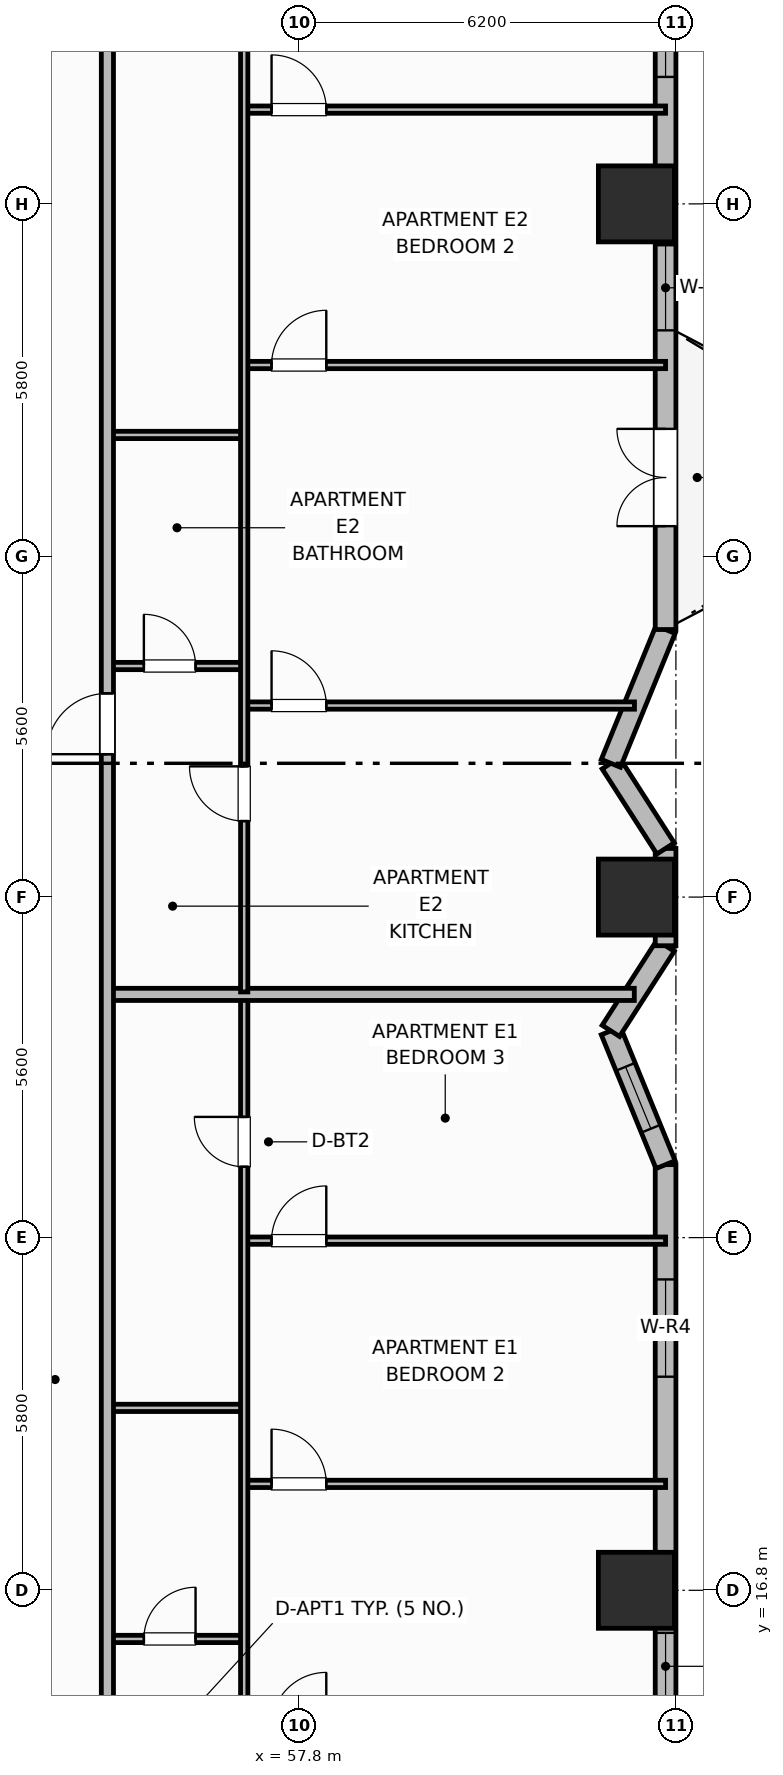
"""IFC4 building model, lengths in metres.
Left out: names, types, materials, properties, quantities, classifications, styles, units other than length and angle.
Written with IfcOpenShell. Run it as: python <this file> out.ifc"""

import sys

from ifc_helpers import new_model, si_unit, direction, frame, frame_2d, origin, origin_2d, place, context, subcontext, project, spatial, rectangle, extrude, element, fill, save


model = new_model("IFC4")
c1 = context("Model", 3, precision=1e-05, world=origin(), true_north=direction((0.0, 1.0)))
c2 = subcontext(c1, "Body", "Model", "MODEL_VIEW")
j1 = project(units=[si_unit("LENGTHUNIT", "METRE"), si_unit("PLANEANGLEUNIT", "RADIAN")], contexts=[c1])
p1 = place(None, origin())
s1 = spatial("IfcSite", under=j1, at=p1, CompositionType="ELEMENT")
p2 = place(p1, origin())
s2 = spatial("IfcBuilding", under=s1, at=p2, CompositionType="ELEMENT")
p3 = place(p2, frame((0.0, 0.0, 43.6)))
s3 = spatial("IfcBuildingStorey", under=s2, at=p3, CompositionType="ELEMENT", Elevation=43.6)
for number, where, z_axis, x_axis in (
    (1, (63.35, 16.8, 0.0), (0.0, 0.0, 1.0), (1.0, 0.0, 0.0)),
    (2, (63.35, 28.2, 0.0), (0.0, 0.0, 1.0), (1.0, 0.0, 0.0)),
    (3, (63.35, 39.6, 0.0), (0.0, 0.0, 1.0), (1.0, 0.0, 0.0)),
):
    element("IfcColumn", number, at=place(p3, frame(where, z_axis=z_axis, x_axis=x_axis)), inside=s3, PredefinedType="COLUMN", context=c2, shape_type="SweptSolid", body=[
        extrude(rectangle(XDim=1.25, YDim=1.25, at=origin_2d()), origin(), (0.0, 0.0, 1.0), 3.7),
    ])
p4 = place(p3, frame((63.83, 9.0, 0.0), z_axis=(0.0, 0.0, 1.0), x_axis=(0.0, 1.0, 0.0)))
e4 = element("IfcWall", 4, at=p4, inside=s3, PredefinedType="SOLIDWALL", context=c2, shape_type="SweptSolid", body=[
    extrude(rectangle(XDim=14.8, YDim=0.34, at=frame_2d((7.4, 0.0))), origin(), (0.0, 0.0, 1.0), 2.7),
])
p5 = place(p4, frame((6.0, 0.0, 0.89)))
e5 = element("IfcOpeningElement", 5, at=p5, cuts=e4, PredefinedType="OPENING", context=c2, shape_type="SweptSolid", body=[
    extrude(rectangle(XDim=1.1, YDim=1.65, at=frame_2d((0.55, 0.825))), frame((0.0, 0.18, 0.0), z_axis=(0.0, -1.0, 0.0), x_axis=(1.0, 0.0, 0.0)), (0.0, 0.0, 1.0), 0.36),
])
p6 = place(p4, frame((11.312, 0.0, 0.68)))
e6 = element("IfcOpeningElement", 6, at=p6, cuts=e4, PredefinedType="OPENING", context=c2, shape_type="SweptSolid", body=[
    extrude(rectangle(XDim=1.6, YDim=1.9, at=frame_2d((0.8, 0.95))), frame((0.0, 0.18, 0.0), z_axis=(0.0, -1.0, 0.0), x_axis=(1.0, 0.0, 0.0)), (0.0, 0.0, 1.0), 0.36),
])
p7 = place(p3, frame((63.83, 23.8, 0.0), z_axis=(0.0, 0.0, 1.0), x_axis=(-0.378692835005, 0.925522412865, 0.0)))
e7 = element("IfcWall", 7, at=p7, inside=s3, PredefinedType="SOLIDWALL", context=c2, shape_type="SweptSolid", body=[
    extrude(rectangle(XDim=2.377, YDim=0.34, at=frame_2d((1.188, 0.0))), origin(), (0.0, 0.0, 1.0), 2.7),
])
p8 = place(p7, frame((0.638, 0.0, 0.89)))
e8 = element("IfcOpeningElement", 8, at=p8, cuts=e7, PredefinedType="OPENING", context=c2, shape_type="SweptSolid", body=[
    extrude(rectangle(XDim=1.1, YDim=1.65, at=frame_2d((0.55, 0.825))), frame((0.0, 0.18, 0.0), z_axis=(0.0, -1.0, 0.0), x_axis=(1.0, 0.0, 0.0)), (0.0, 0.0, 1.0), 0.36),
])
p9 = place(p3, frame((62.93, 26.0, 0.0), z_axis=(0.0, 0.0, 1.0), x_axis=(0.540846555596, 0.841121277403, 0.0)))
e9 = element("IfcWall", 9, at=p9, inside=s3, PredefinedType="SOLIDWALL", context=c2, shape_type="SweptSolid", body=[
    extrude(rectangle(XDim=1.664, YDim=0.34, at=frame_2d((0.832, 0.0))), origin(), (0.0, 0.0, 1.0), 2.7),
])
p10 = place(p3, frame((63.83, 27.4, 0.0), z_axis=(0.0, 0.0, 1.0), x_axis=(0.0, 1.0, 0.0)))
e10 = element("IfcWall", 10, at=p10, inside=s3, PredefinedType="SOLIDWALL", context=c2, shape_type="SweptSolid", body=[
    extrude(rectangle(XDim=1.6, YDim=0.34, at=frame_2d((0.8, 0.0))), origin(), (0.0, 0.0, 1.0), 2.7),
])
p11 = place(p3, frame((63.83, 29.0, 0.0), z_axis=(0.0, 0.0, 1.0), x_axis=(-0.540846555596, 0.841121277403, 0.0)))
e11 = element("IfcWall", 11, at=p11, inside=s3, PredefinedType="SOLIDWALL", context=c2, shape_type="SweptSolid", body=[
    extrude(rectangle(XDim=1.664, YDim=0.34, at=frame_2d((0.832, 0.0))), origin(), (0.0, 0.0, 1.0), 2.7),
])
p12 = place(p3, frame((62.93, 30.4, 0.0), z_axis=(0.0, 0.0, 1.0), x_axis=(0.378656839344, 0.925537140269, 0.0)))
e12 = element("IfcWall", 12, at=p12, inside=s3, PredefinedType="SOLIDWALL", context=c2, shape_type="SweptSolid", body=[
    extrude(rectangle(XDim=2.377, YDim=0.34, at=frame_2d((1.188, 0.0))), origin(), (0.0, 0.0, 1.0), 2.7),
])
p13 = place(p3, frame((63.83, 32.6, 0.0), z_axis=(0.0, 0.0, 1.0), x_axis=(0.0, 1.0, 0.0)))
e13 = element("IfcWall", 13, at=p13, inside=s3, PredefinedType="SOLIDWALL", context=c2, shape_type="SweptSolid", body=[
    extrude(rectangle(XDim=14.8, YDim=0.34, at=frame_2d((7.4, 0.0))), origin(), (0.0, 0.0, 1.0), 2.7),
])
p14 = place(p13, frame((1.7, 0.0, 0.0)))
e14 = element("IfcOpeningElement", 14, at=p14, cuts=e13, PredefinedType="OPENING", context=c2, shape_type="SweptSolid", body=[
    extrude(rectangle(XDim=1.6, YDim=2.1, at=frame_2d((0.8, 1.05))), frame((0.0, 0.18, 0.0), z_axis=(0.0, -1.0, 0.0), x_axis=(1.0, 0.0, 0.0)), (0.0, 0.0, 1.0), 0.36),
])
p15 = place(p13, frame((4.92, 0.0, 0.69)))
e15 = element("IfcOpeningElement", 15, at=p15, cuts=e13, PredefinedType="OPENING", context=c2, shape_type="SweptSolid", body=[
    extrude(rectangle(XDim=1.4, YDim=1.85, at=frame_2d((0.7, 0.925))), frame((0.0, 0.18, 0.0), z_axis=(0.0, -1.0, 0.0), x_axis=(1.0, 0.0, 0.0)), (0.0, 0.0, 1.0), 0.36),
])
p16 = place(p13, frame((9.087, 0.0, 0.73)))
e16 = element("IfcOpeningElement", 16, at=p16, cuts=e13, PredefinedType="OPENING", context=c2, shape_type="SweptSolid", body=[
    extrude(rectangle(XDim=1.4, YDim=1.85, at=frame_2d((0.7, 0.925))), frame((0.0, 0.18, 0.0), z_axis=(0.0, -1.0, 0.0), x_axis=(1.0, 0.0, 0.0)), (0.0, 0.0, 1.0), 0.36),
])
p17 = place(p3, frame((54.65, 16.0, 0.0), z_axis=(0.0, 0.0, 1.0), x_axis=(1.0, 0.0, 0.0)))
e17 = element("IfcWall", 17, at=p17, inside=s3, PredefinedType="PARTITIONING", context=c2, shape_type="SweptSolid", body=[
    extrude(rectangle(XDim=2.25, YDim=0.12, at=frame_2d((1.125, 0.0))), origin(), (0.0, 0.0, 1.0), 2.53),
])
p18 = place(p17, frame((0.6, 0.0, 0.0)))
e18 = element("IfcOpeningElement", 18, at=p18, cuts=e17, PredefinedType="OPENING", context=c2, shape_type="SweptSolid", body=[
    extrude(rectangle(XDim=0.85, YDim=2.1, at=frame_2d((0.425, 1.05))), frame((0.0, 0.07, 0.0), z_axis=(0.0, -1.0, 0.0), x_axis=(1.0, 0.0, 0.0)), (0.0, 0.0, 1.0), 0.14),
])
p19 = place(p3, frame((54.65, 19.8, 0.0), z_axis=(0.0, 0.0, 1.0), x_axis=(1.0, 0.0, 0.0)))
e19 = element("IfcWall", 19, at=p19, inside=s3, PredefinedType="PARTITIONING", context=c2, shape_type="SweptSolid", body=[
    extrude(rectangle(XDim=2.25, YDim=0.12, at=frame_2d((1.125, 0.0))), origin(), (0.0, 0.0, 1.0), 2.53),
])
p20 = place(p3, frame((56.9, 18.55, 0.0), z_axis=(0.0, 0.0, 1.0), x_axis=(1.0, 0.0, 0.0)))
e20 = element("IfcWall", 20, at=p20, inside=s3, PredefinedType="PARTITIONING", context=c2, shape_type="SweptSolid", body=[
    extrude(rectangle(XDim=6.93, YDim=0.12, at=frame_2d((3.465, 0.0))), origin(), (0.0, 0.0, 1.0), 2.53),
])
p21 = place(p20, frame((0.45, 0.0, 0.0)))
e21 = element("IfcOpeningElement", 21, at=p21, cuts=e20, PredefinedType="OPENING", context=c2, shape_type="SweptSolid", body=[
    extrude(rectangle(XDim=0.9, YDim=2.1, at=frame_2d((0.45, 1.05))), frame((0.0, 0.07, 0.0), z_axis=(0.0, -1.0, 0.0), x_axis=(1.0, 0.0, 0.0)), (0.0, 0.0, 1.0), 0.14),
])
p22 = place(p3, frame((56.9, 22.55, 0.0), z_axis=(0.0, 0.0, 1.0), x_axis=(1.0, 0.0, 0.0)))
e22 = element("IfcWall", 22, at=p22, inside=s3, PredefinedType="PARTITIONING", context=c2, shape_type="SweptSolid", body=[
    extrude(rectangle(XDim=6.93, YDim=0.12, at=frame_2d((3.465, 0.0))), origin(), (0.0, 0.0, 1.0), 2.53),
])
p23 = place(p22, frame((0.45, 0.0, 0.0)))
e23 = element("IfcOpeningElement", 23, at=p23, cuts=e22, PredefinedType="OPENING", context=c2, shape_type="SweptSolid", body=[
    extrude(rectangle(XDim=0.9, YDim=2.1, at=frame_2d((0.45, 1.05))), frame((0.0, 0.07, 0.0), z_axis=(0.0, -1.0, 0.0), x_axis=(1.0, 0.0, 0.0)), (0.0, 0.0, 1.0), 0.14),
])
p24 = place(p3, frame((56.9, 10.64, 0.0), z_axis=(0.0, 0.0, 1.0), x_axis=(0.0, 1.0, 0.0)))
e24 = element("IfcWall", 24, at=p24, inside=s3, PredefinedType="PARTITIONING", context=c2, shape_type="SweptSolid", body=[
    extrude(rectangle(XDim=15.92, YDim=0.12, at=frame_2d((7.96, 0.0))), origin(), (0.0, 0.0, 1.0), 2.53),
])
p25 = place(p24, frame((0.41, 0.0, 0.0)))
e25 = element("IfcOpeningElement", 25, at=p25, cuts=e24, PredefinedType="OPENING", context=c2, shape_type="SweptSolid", body=[
    extrude(rectangle(XDim=0.9, YDim=2.1, at=frame_2d((0.45, 1.05))), frame((0.0, 0.07, 0.0), z_axis=(0.0, -1.0, 0.0), x_axis=(1.0, 0.0, 0.0)), (0.0, 0.0, 1.0), 0.14),
])
p26 = place(p24, frame((13.125, 0.0, 0.0)))
e26 = element("IfcOpeningElement", 26, at=p26, cuts=e24, PredefinedType="OPENING", context=c2, shape_type="SweptSolid", body=[
    extrude(rectangle(XDim=0.82, YDim=2.08, at=frame_2d((0.41, 1.04))), frame((0.0, 0.07, 0.0), z_axis=(0.0, -1.0, 0.0), x_axis=(1.0, 0.0, 0.0)), (0.0, 0.0, 1.0), 0.14),
])
p27 = place(p3, frame((54.65, 26.6, 0.0), z_axis=(0.0, 0.0, 1.0), x_axis=(1.0, 0.0, 0.0)))
e27 = element("IfcWall", 27, at=p27, inside=s3, PredefinedType="PARTITIONING", context=c2, shape_type="SweptSolid", body=[
    extrude(rectangle(XDim=8.666, YDim=0.2, at=frame_2d((4.333, 0.0))), origin(), (0.0, 0.0, 1.0), 2.53),
])
p28 = place(p3, frame((54.65, 32.0, 0.0), z_axis=(0.0, 0.0, 1.0), x_axis=(1.0, 0.0, 0.0)))
e28 = element("IfcWall", 28, at=p28, inside=s3, PredefinedType="PARTITIONING", context=c2, shape_type="SweptSolid", body=[
    extrude(rectangle(XDim=2.25, YDim=0.12, at=frame_2d((1.125, 0.0))), origin(), (0.0, 0.0, 1.0), 2.53),
])
p29 = place(p28, frame((0.6, 0.0, 0.0)))
e29 = element("IfcOpeningElement", 29, at=p29, cuts=e28, PredefinedType="OPENING", context=c2, shape_type="SweptSolid", body=[
    extrude(rectangle(XDim=0.85, YDim=2.1, at=frame_2d((0.425, 1.05))), frame((0.0, 0.07, 0.0), z_axis=(0.0, -1.0, 0.0), x_axis=(1.0, 0.0, 0.0)), (0.0, 0.0, 1.0), 0.14),
])
p30 = place(p3, frame((54.65, 35.8, 0.0), z_axis=(0.0, 0.0, 1.0), x_axis=(1.0, 0.0, 0.0)))
e30 = element("IfcWall", 30, at=p30, inside=s3, PredefinedType="PARTITIONING", context=c2, shape_type="SweptSolid", body=[
    extrude(rectangle(XDim=2.25, YDim=0.12, at=frame_2d((1.125, 0.0))), origin(), (0.0, 0.0, 1.0), 2.53),
])
p31 = place(p3, frame((56.9, 31.35, 0.0), z_axis=(0.0, 0.0, 1.0), x_axis=(1.0, 0.0, 0.0)))
e31 = element("IfcWall", 31, at=p31, inside=s3, PredefinedType="PARTITIONING", context=c2, shape_type="SweptSolid", body=[
    extrude(rectangle(XDim=6.419, YDim=0.12, at=frame_2d((3.209, 0.0))), origin(), (0.0, 0.0, 1.0), 2.53),
])
p32 = place(p31, frame((0.45, 0.0, 0.0)))
e32 = element("IfcOpeningElement", 32, at=p32, cuts=e31, PredefinedType="OPENING", context=c2, shape_type="SweptSolid", body=[
    extrude(rectangle(XDim=0.9, YDim=2.1, at=frame_2d((0.45, 1.05))), frame((0.0, 0.07, 0.0), z_axis=(0.0, -1.0, 0.0), x_axis=(1.0, 0.0, 0.0)), (0.0, 0.0, 1.0), 0.14),
])
p33 = place(p3, frame((56.9, 36.95, 0.0), z_axis=(0.0, 0.0, 1.0), x_axis=(1.0, 0.0, 0.0)))
e33 = element("IfcWall", 33, at=p33, inside=s3, PredefinedType="PARTITIONING", context=c2, shape_type="SweptSolid", body=[
    extrude(rectangle(XDim=6.93, YDim=0.12, at=frame_2d((3.465, 0.0))), origin(), (0.0, 0.0, 1.0), 2.53),
])
p34 = place(p33, frame((0.45, 0.0, 0.0)))
e34 = element("IfcOpeningElement", 34, at=p34, cuts=e33, PredefinedType="OPENING", context=c2, shape_type="SweptSolid", body=[
    extrude(rectangle(XDim=0.9, YDim=2.1, at=frame_2d((0.45, 1.05))), frame((0.0, 0.07, 0.0), z_axis=(0.0, -1.0, 0.0), x_axis=(1.0, 0.0, 0.0)), (0.0, 0.0, 1.0), 0.14),
])
p35 = place(p3, frame((56.9, 41.15, 0.0), z_axis=(0.0, 0.0, 1.0), x_axis=(1.0, 0.0, 0.0)))
e35 = element("IfcWall", 35, at=p35, inside=s3, PredefinedType="PARTITIONING", context=c2, shape_type="SweptSolid", body=[
    extrude(rectangle(XDim=6.93, YDim=0.12, at=frame_2d((3.465, 0.0))), origin(), (0.0, 0.0, 1.0), 2.53),
])
p36 = place(p35, frame((0.45, 0.0, 0.0)))
e36 = element("IfcOpeningElement", 36, at=p36, cuts=e35, PredefinedType="OPENING", context=c2, shape_type="SweptSolid", body=[
    extrude(rectangle(XDim=0.9, YDim=2.1, at=frame_2d((0.45, 1.05))), frame((0.0, 0.07, 0.0), z_axis=(0.0, -1.0, 0.0), x_axis=(1.0, 0.0, 0.0)), (0.0, 0.0, 1.0), 0.14),
])
p37 = place(p3, frame((56.9, 26.64, 0.0), z_axis=(0.0, 0.0, 1.0), x_axis=(0.0, 1.0, 0.0)))
e37 = element("IfcWall", 37, at=p37, inside=s3, PredefinedType="PARTITIONING", context=c2, shape_type="SweptSolid", body=[
    extrude(rectangle(XDim=19.12, YDim=0.12, at=frame_2d((9.56, 0.0))), origin(), (0.0, 0.0, 1.0), 2.53),
])
p38 = place(p37, frame((2.81, 0.0, 0.0)))
e38 = element("IfcOpeningElement", 38, at=p38, cuts=e37, PredefinedType="OPENING", context=c2, shape_type="SweptSolid", body=[
    extrude(rectangle(XDim=0.9, YDim=2.1, at=frame_2d((0.45, 1.05))), frame((0.0, 0.07, 0.0), z_axis=(0.0, -1.0, 0.0), x_axis=(1.0, 0.0, 0.0)), (0.0, 0.0, 1.0), 0.14),
])
p39 = place(p37, frame((16.18, 0.0, 0.0)))
e39 = element("IfcOpeningElement", 39, at=p39, cuts=e37, PredefinedType="OPENING", context=c2, shape_type="SweptSolid", body=[
    extrude(rectangle(XDim=0.82, YDim=2.08, at=frame_2d((0.41, 1.04))), frame((0.0, 0.07, 0.0), z_axis=(0.0, -1.0, 0.0), x_axis=(1.0, 0.0, 0.0)), (0.0, 0.0, 1.0), 0.14),
])
p40 = place(p3, frame((54.65, 10.6, 0.0), z_axis=(0.0, 0.0, 1.0), x_axis=(0.0, 1.0, 0.0)))
e40 = element("IfcWall", 40, at=p40, inside=s3, PredefinedType="PARTITIONING", context=c2, shape_type="SweptSolid", body=[
    extrude(rectangle(XDim=35.2, YDim=0.2, at=frame_2d((17.6, 0.0))), origin(), (0.0, 0.0, 1.0), 2.53),
])
p41 = place(p40, frame((2.65, 0.0, 0.0)))
e41 = element("IfcOpeningElement", 41, at=p41, cuts=e40, PredefinedType="OPENING", context=c2, shape_type="SweptSolid", body=[
    extrude(rectangle(XDim=1.0, YDim=2.15, at=frame_2d((0.5, 1.075))), frame((0.0, 0.11, 0.0), z_axis=(0.0, -1.0, 0.0), x_axis=(1.0, 0.0, 0.0)), (0.0, 0.0, 1.0), 0.22),
])
p42 = place(p40, frame((19.95, 0.0, 0.0)))
e42 = element("IfcOpeningElement", 42, at=p42, cuts=e40, PredefinedType="OPENING", context=c2, shape_type="SweptSolid", body=[
    extrude(rectangle(XDim=1.0, YDim=2.15, at=frame_2d((0.5, 1.075))), frame((0.0, 0.11, 0.0), z_axis=(0.0, -1.0, 0.0), x_axis=(1.0, 0.0, 0.0)), (0.0, 0.0, 1.0), 0.22),
])
p43 = place(p5, origin())
e43 = element("IfcWindow", 43, at=p43, inside=s3, PartitioningType="SINGLE_PANEL", PredefinedType="WINDOW", context=c2, shape_type="SweptSolid", body=[
    extrude(rectangle(XDim=1.1, YDim=1.65, at=frame_2d((0.55, 0.825))), frame((0.0, 0.03, 0.0), z_axis=(0.0, -1.0, 0.0), x_axis=(1.0, 0.0, 0.0)), (0.0, 0.0, 1.0), 0.06),
])
fill(e5, e43)
p44 = place(p6, origin())
e44 = element("IfcWindow", 44, at=p44, inside=s3, PartitioningType="SINGLE_PANEL", PredefinedType="WINDOW", context=c2, shape_type="SweptSolid", body=[
    extrude(rectangle(XDim=1.6, YDim=1.9, at=frame_2d((0.8, 0.95))), frame((0.0, 0.03, 0.0), z_axis=(0.0, -1.0, 0.0), x_axis=(1.0, 0.0, 0.0)), (0.0, 0.0, 1.0), 0.06),
])
fill(e6, e44)
p45 = place(p8, origin())
e45 = element("IfcWindow", 45, at=p45, inside=s3, PartitioningType="SINGLE_PANEL", PredefinedType="WINDOW", context=c2, shape_type="SweptSolid", body=[
    extrude(rectangle(XDim=1.1, YDim=1.65, at=frame_2d((0.55, 0.825))), frame((0.0, 0.03, 0.0), z_axis=(0.0, -1.0, 0.0), x_axis=(1.0, 0.0, 0.0)), (0.0, 0.0, 1.0), 0.06),
])
fill(e8, e45)
p46 = place(p14, origin())
e46 = element("IfcDoor", 46, at=p46, inside=s3, OperationType="DOUBLE_DOOR_SINGLE_SWING", PredefinedType="DOOR", context=c2, shape_type="SweptSolid", body=[
    extrude(rectangle(XDim=1.6, YDim=2.1, at=frame_2d((0.8, 1.05))), frame((0.0, 0.025, 0.0), z_axis=(0.0, -1.0, 0.0), x_axis=(1.0, 0.0, 0.0)), (0.0, 0.0, 1.0), 0.05),
])
fill(e14, e46)
p47 = place(p15, origin())
e47 = element("IfcWindow", 47, at=p47, inside=s3, PartitioningType="SINGLE_PANEL", PredefinedType="WINDOW", context=c2, shape_type="SweptSolid", body=[
    extrude(rectangle(XDim=1.4, YDim=1.85, at=frame_2d((0.7, 0.925))), frame((0.0, 0.03, 0.0), z_axis=(0.0, -1.0, 0.0), x_axis=(1.0, 0.0, 0.0)), (0.0, 0.0, 1.0), 0.06),
])
fill(e15, e47)
p48 = place(p16, origin())
e48 = element("IfcWindow", 48, at=p48, inside=s3, PartitioningType="SINGLE_PANEL", PredefinedType="WINDOW", context=c2, shape_type="SweptSolid", body=[
    extrude(rectangle(XDim=1.4, YDim=1.85, at=frame_2d((0.7, 0.925))), frame((0.0, 0.03, 0.0), z_axis=(0.0, -1.0, 0.0), x_axis=(1.0, 0.0, 0.0)), (0.0, 0.0, 1.0), 0.06),
])
fill(e16, e48)
p49 = place(p18, origin())
e49 = element("IfcDoor", 49, at=p49, inside=s3, OperationType="SINGLE_SWING_RIGHT", PredefinedType="DOOR", context=c2, shape_type="SweptSolid", body=[
    extrude(rectangle(XDim=0.85, YDim=2.1, at=frame_2d((0.425, 1.05))), frame((0.0, 0.025, 0.0), z_axis=(0.0, -1.0, 0.0), x_axis=(1.0, 0.0, 0.0)), (0.0, 0.0, 1.0), 0.05),
])
fill(e18, e49)
p50 = place(p21, origin())
e50 = element("IfcDoor", 50, at=p50, inside=s3, OperationType="SINGLE_SWING_LEFT", PredefinedType="DOOR", context=c2, shape_type="SweptSolid", body=[
    extrude(rectangle(XDim=0.9, YDim=2.1, at=frame_2d((0.45, 1.05))), frame((0.0, 0.025, 0.0), z_axis=(0.0, -1.0, 0.0), x_axis=(1.0, 0.0, 0.0)), (0.0, 0.0, 1.0), 0.05),
])
fill(e21, e50)
p51 = place(p23, origin())
e51 = element("IfcDoor", 51, at=p51, inside=s3, OperationType="SINGLE_SWING_RIGHT", PredefinedType="DOOR", context=c2, shape_type="SweptSolid", body=[
    extrude(rectangle(XDim=0.9, YDim=2.1, at=frame_2d((0.45, 1.05))), frame((0.0, 0.025, 0.0), z_axis=(0.0, -1.0, 0.0), x_axis=(1.0, 0.0, 0.0)), (0.0, 0.0, 1.0), 0.05),
])
fill(e23, e51)
p52 = place(p26, origin())
e52 = element("IfcDoor", 52, at=p52, inside=s3, OperationType="SINGLE_SWING_RIGHT", PredefinedType="DOOR", context=c2, shape_type="SweptSolid", body=[
    extrude(rectangle(XDim=0.82, YDim=2.08, at=frame_2d((0.41, 1.04))), frame((0.0, 0.025, 0.0), z_axis=(0.0, -1.0, 0.0), x_axis=(1.0, 0.0, 0.0)), (0.0, 0.0, 1.0), 0.05),
])
fill(e26, e52)
p53 = place(p29, origin())
e53 = element("IfcDoor", 53, at=p53, inside=s3, OperationType="SINGLE_SWING_LEFT", PredefinedType="DOOR", context=c2, shape_type="SweptSolid", body=[
    extrude(rectangle(XDim=0.85, YDim=2.1, at=frame_2d((0.425, 1.05))), frame((0.0, 0.025, 0.0), z_axis=(0.0, -1.0, 0.0), x_axis=(1.0, 0.0, 0.0)), (0.0, 0.0, 1.0), 0.05),
])
fill(e29, e53)
p54 = place(p32, origin())
e54 = element("IfcDoor", 54, at=p54, inside=s3, OperationType="SINGLE_SWING_LEFT", PredefinedType="DOOR", context=c2, shape_type="SweptSolid", body=[
    extrude(rectangle(XDim=0.9, YDim=2.1, at=frame_2d((0.45, 1.05))), frame((0.0, 0.025, 0.0), z_axis=(0.0, -1.0, 0.0), x_axis=(1.0, 0.0, 0.0)), (0.0, 0.0, 1.0), 0.05),
])
fill(e32, e54)
p55 = place(p34, origin())
e55 = element("IfcDoor", 55, at=p55, inside=s3, OperationType="SINGLE_SWING_RIGHT", PredefinedType="DOOR", context=c2, shape_type="SweptSolid", body=[
    extrude(rectangle(XDim=0.9, YDim=2.1, at=frame_2d((0.45, 1.05))), frame((0.0, 0.025, 0.0), z_axis=(0.0, -1.0, 0.0), x_axis=(1.0, 0.0, 0.0)), (0.0, 0.0, 1.0), 0.05),
])
fill(e34, e55)
p56 = place(p36, origin())
e56 = element("IfcDoor", 56, at=p56, inside=s3, OperationType="SINGLE_SWING_LEFT", PredefinedType="DOOR", context=c2, shape_type="SweptSolid", body=[
    extrude(rectangle(XDim=0.9, YDim=2.1, at=frame_2d((0.45, 1.05))), frame((0.0, 0.025, 0.0), z_axis=(0.0, -1.0, 0.0), x_axis=(1.0, 0.0, 0.0)), (0.0, 0.0, 1.0), 0.05),
])
fill(e36, e56)
p57 = place(p38, origin())
e57 = element("IfcDoor", 57, at=p57, inside=s3, OperationType="SINGLE_SWING_RIGHT", PredefinedType="DOOR", context=c2, shape_type="SweptSolid", body=[
    extrude(rectangle(XDim=0.9, YDim=2.1, at=frame_2d((0.45, 1.05))), frame((0.0, 0.025, 0.0), z_axis=(0.0, -1.0, 0.0), x_axis=(1.0, 0.0, 0.0)), (0.0, 0.0, 1.0), 0.05),
])
fill(e38, e57)
p58 = place(p42, origin())
e58 = element("IfcDoor", 58, at=p58, inside=s3, OperationType="SINGLE_SWING_LEFT", PredefinedType="DOOR", context=c2, shape_type="SweptSolid", body=[
    extrude(rectangle(XDim=1.0, YDim=2.15, at=frame_2d((0.5, 1.075))), frame((0.0, 0.025, 0.0), z_axis=(0.0, -1.0, 0.0), x_axis=(1.0, 0.0, 0.0)), (0.0, 0.0, 1.0), 0.05),
])
fill(e42, e58)
save(model, sys.argv[1])
